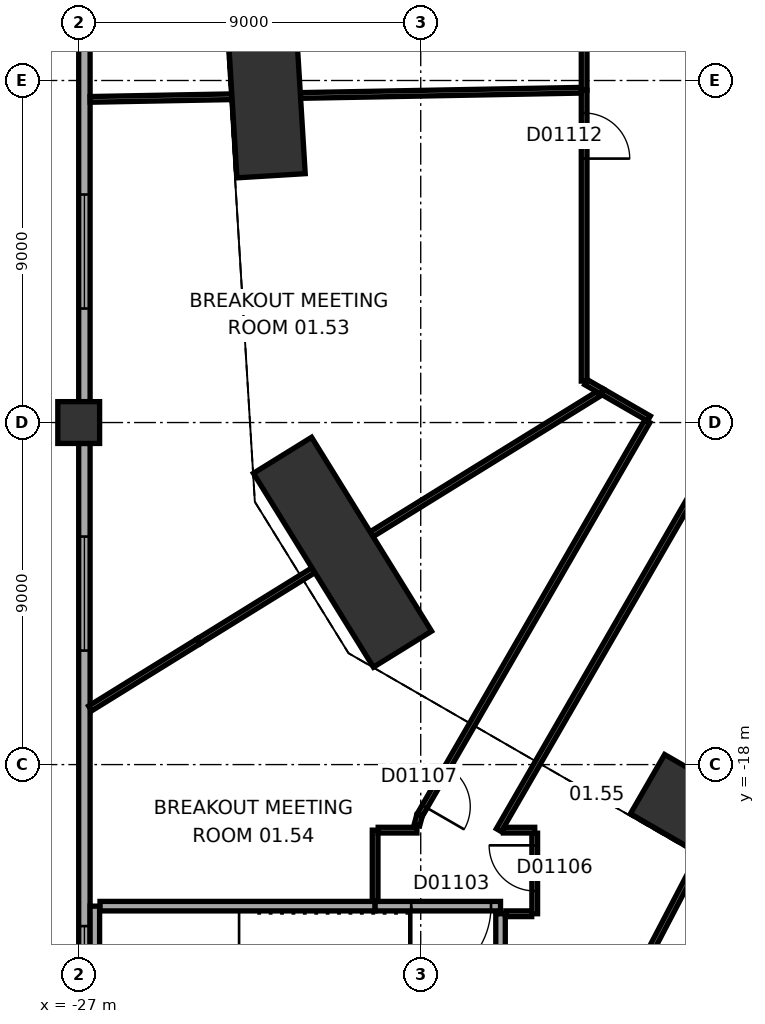
"""IFC4 building model, lengths in metres.
Left out: names, types, materials, properties, quantities, classifications, styles, units other than length and angle.
Written with IfcOpenShell. Run it as: python <this file> out.ifc"""

import sys

from ifc_helpers import new_model, si_unit, direction, frame, frame_2d, origin, origin_2d, place, context, subcontext, project, spatial, rectangle, extrude, element, fill, save


model = new_model("IFC4")
c1 = context("Model", 3, precision=1e-05, world=origin(), true_north=direction((0.0, 1.0)))
c2 = subcontext(c1, "Body", "Model", "MODEL_VIEW")
j1 = project(units=[si_unit("LENGTHUNIT", "METRE"), si_unit("PLANEANGLEUNIT", "RADIAN")], contexts=[c1])
p1 = place(None, origin())
s1 = spatial("IfcSite", under=j1, at=p1, CompositionType="ELEMENT")
p2 = place(p1, origin())
s2 = spatial("IfcBuilding", under=s1, at=p2, CompositionType="ELEMENT")
p3 = place(p2, frame((0.0, 0.0, 7.5)))
s3 = spatial("IfcBuildingStorey", under=s2, at=p3, CompositionType="ELEMENT", Elevation=7.5)
p4 = place(p3, frame((-22.066, -0.411, 0.0), z_axis=(0.0, 0.0, 1.0), x_axis=(0.061046797461, -0.99813490497, 0.0)))
e1 = element("IfcColumn", 1, at=p4, inside=s3, PredefinedType="COLUMN", context=c2, shape_type="SweptSolid", body=[
    extrude(rectangle(XDim=4.2, YDim=1.8, at=origin_2d()), origin(), (0.0, 0.0, 1.0), 5.5),
])
p5 = place(p3, frame((-20.058, -12.413, 0.0), z_axis=(0.0, 0.0, 1.0), x_axis=(0.526202050444, -0.850359572245, 0.0)))
e2 = element("IfcColumn", 2, at=p5, inside=s3, PredefinedType="COLUMN", context=c2, shape_type="SweptSolid", body=[
    extrude(rectangle(XDim=6.0, YDim=1.8, at=origin_2d()), origin(), (0.0, 0.0, 1.0), 5.5),
])
p6 = place(p3, frame((-10.213, -19.564, 0.0), z_axis=(0.0, 0.0, 1.0), x_axis=(0.866028021766, -0.499995465495, 0.0)))
e3 = element("IfcColumn", 3, at=p6, inside=s3, PredefinedType="COLUMN", context=c2, shape_type="SweptSolid", body=[
    extrude(rectangle(XDim=4.2, YDim=1.8, at=origin_2d()), origin(), (0.0, 0.0, 1.0), 5.5),
])
p7 = place(p3, frame((-27.0, -9.0, 0.0), z_axis=(0.0, 0.0, 1.0), x_axis=(1.0, 0.0, 0.0)))
e4 = element("IfcColumn", 4, at=p7, inside=s3, PredefinedType="COLUMN", context=c2, shape_type="SweptSolid", body=[
    extrude(rectangle(XDim=1.1, YDim=1.1, at=origin_2d()), origin(), (0.0, 0.0, 1.0), 5.5),
])
p8 = place(p3, frame((-26.85, 8.45, 0.0), z_axis=(0.0, 0.0, 1.0), x_axis=(0.0, -1.0, 0.0)))
e5 = element("IfcWall", 5, at=p8, inside=s3, PredefinedType="STANDARD", context=c2, shape_type="SweptSolid", body=[
    extrude(rectangle(XDim=16.9, YDim=0.3, at=frame_2d((8.45, 0.0))), origin(), (0.0, 0.0, 1.0), 4.0),
])
p9 = place(p8, frame((2.45, 0.0, 1.0)))
e6 = element("IfcOpeningElement", 6, at=p9, cuts=e5, PredefinedType="OPENING", context=c2, shape_type="SweptSolid", body=[
    extrude(rectangle(XDim=3.0, YDim=2.6, at=frame_2d((1.5, 1.3))), frame((0.0, 0.16, 0.0), z_axis=(0.0, -1.0, 0.0), x_axis=(1.0, 0.0, 0.0)), (0.0, 0.0, 1.0), 0.32),
])
p10 = place(p8, frame((11.45, 0.0, 1.0)))
e7 = element("IfcOpeningElement", 7, at=p10, cuts=e5, PredefinedType="OPENING", context=c2, shape_type="SweptSolid", body=[
    extrude(rectangle(XDim=3.0, YDim=2.6, at=frame_2d((1.5, 1.3))), frame((0.0, 0.16, 0.0), z_axis=(0.0, -1.0, 0.0), x_axis=(1.0, 0.0, 0.0)), (0.0, 0.0, 1.0), 0.32),
])
p11 = place(p3, frame((-26.85, -9.55, 0.0), z_axis=(0.0, 0.0, 1.0), x_axis=(0.0, -1.0, 0.0)))
e8 = element("IfcWall", 8, at=p11, inside=s3, PredefinedType="STANDARD", context=c2, shape_type="SweptSolid", body=[
    extrude(rectangle(XDim=16.9, YDim=0.3, at=frame_2d((8.45, 0.0))), origin(), (0.0, 0.0, 1.0), 4.0),
])
p12 = place(p11, frame((2.45, 0.0, 1.0)))
e9 = element("IfcOpeningElement", 9, at=p12, cuts=e8, PredefinedType="OPENING", context=c2, shape_type="SweptSolid", body=[
    extrude(rectangle(XDim=3.0, YDim=2.6, at=frame_2d((1.5, 1.3))), frame((0.0, 0.16, 0.0), z_axis=(0.0, -1.0, 0.0), x_axis=(1.0, 0.0, 0.0)), (0.0, 0.0, 1.0), 0.32),
])
p13 = place(p11, frame((12.7, 0.0, 1.0)))
e10 = element("IfcOpeningElement", 10, at=p13, cuts=e8, PredefinedType="OPENING", context=c2, shape_type="SweptSolid", body=[
    extrude(rectangle(XDim=3.0, YDim=2.6, at=frame_2d((1.5, 1.3))), frame((0.0, 0.16, 0.0), z_axis=(0.0, -1.0, 0.0), x_axis=(1.0, 0.0, 0.0)), (0.0, 0.0, 1.0), 0.32),
])
p14 = place(p3, frame((-12.686, -24.3, 0.0), z_axis=(0.0, 0.0, 1.0), x_axis=(0.462800821993, 0.88646229427, 0.0)))
e11 = element("IfcWall", 11, at=p14, inside=s3, PredefinedType="PARTITIONING", context=c2, shape_type="SweptSolid", body=[
    extrude(rectangle(XDim=4.441, YDim=0.15, at=frame_2d((2.221, 0.0))), origin(), (0.0, 0.0, 1.0), 5.2),
])
p15 = place(p3, frame((-15.9, -21.925, 0.0), z_axis=(0.0, 0.0, 1.0), x_axis=(0.0, -1.0, 0.0)))
e12 = element("IfcWall", 12, at=p15, inside=s3, PredefinedType="SOLIDWALL", context=c2, shape_type="SweptSolid", body=[
    extrude(rectangle(XDim=4.515, YDim=0.25, at=frame_2d((2.257, 0.0))), origin(), (0.0, 0.0, 1.0), 5.2),
])
p16 = place(p3, frame((-15.08, -21.925, 0.0), z_axis=(0.0, 0.0, 1.0), x_axis=(-1.0, 0.0, 0.0)))
e13 = element("IfcWall", 13, at=p16, inside=s3, PredefinedType="PARTITIONING", context=c2, shape_type="SweptSolid", body=[
    extrude(rectangle(XDim=0.68, YDim=0.15, at=frame_2d((0.34, 0.0))), origin(), (0.0, 0.0, 1.0), 5.2),
])
p17 = place(p3, frame((-26.44, -21.725, 0.0), z_axis=(0.0, 0.0, 1.0), x_axis=(1.0, 0.0, 0.0)))
e14 = element("IfcWall", 14, at=p17, inside=s3, PredefinedType="SOLIDWALL", context=c2, shape_type="SweptSolid", body=[
    extrude(rectangle(XDim=7.24, YDim=0.25, at=frame_2d((3.62, 0.0))), origin(), (0.0, 0.0, 1.0), 5.2),
])
p18 = place(p3, frame((-19.2, -21.725, 0.0), z_axis=(0.0, 0.0, 1.0), x_axis=(1.0, 0.0, 0.0)))
e15 = element("IfcWall", 15, at=p18, inside=s3, PredefinedType="SOLIDWALL", context=c2, shape_type="SweptSolid", body=[
    extrude(rectangle(XDim=3.3, YDim=0.25, at=frame_2d((1.65, 0.0))), origin(), (0.0, 0.0, 1.0), 5.2),
])
p19 = place(p18, frame((0.95, 0.0, 0.0)))
e16 = element("IfcOpeningElement", 16, at=p19, cuts=e15, PredefinedType="OPENING", context=c2, shape_type="SweptSolid", body=[
    extrude(rectangle(XDim=2.1, YDim=2.4, at=frame_2d((1.05, 1.2))), frame((0.0, 0.135, 0.0), z_axis=(0.0, -1.0, 0.0), x_axis=(1.0, 0.0, 0.0)), (0.0, 0.0, 1.0), 0.27),
])
p20 = place(p3, frame((-19.2, -21.585, 0.0), z_axis=(0.0, 0.0, 1.0), x_axis=(0.0, 1.0, 0.0)))
e17 = element("IfcWall", 17, at=p20, inside=s3, PredefinedType="PARTITIONING", context=c2, shape_type="SweptSolid", body=[
    extrude(rectangle(XDim=1.86, YDim=0.15, at=frame_2d((0.93, 0.0))), origin(), (0.0, 0.0, 1.0), 5.2),
])
p21 = place(p3, frame((-15.0, -19.805, 0.0), z_axis=(0.0, 0.0, 1.0), x_axis=(0.0, -1.0, 0.0)))
e18 = element("IfcWall", 18, at=p21, inside=s3, PredefinedType="PARTITIONING", context=c2, shape_type="SweptSolid", body=[
    extrude(rectangle(XDim=2.12, YDim=0.15, at=frame_2d((1.06, 0.0))), origin(), (0.0, 0.0, 1.0), 5.2),
])
p22 = place(p21, frame((0.32, 0.0, 0.0)))
e19 = element("IfcOpeningElement", 19, at=p22, cuts=e18, PredefinedType="OPENING", context=c2, shape_type="SweptSolid", body=[
    extrude(rectangle(XDim=1.2, YDim=2.1, at=frame_2d((0.6, 1.05))), frame((0.0, 0.085, 0.0), z_axis=(0.0, -1.0, 0.0), x_axis=(1.0, 0.0, 0.0)), (0.0, 0.0, 1.0), 0.17),
])
p23 = place(p3, frame((-19.12, -19.725, 0.0), z_axis=(0.0, 0.0, 1.0), x_axis=(1.0, 0.0, 0.0)))
e20 = element("IfcWall", 20, at=p23, inside=s3, PredefinedType="PARTITIONING", context=c2, shape_type="SweptSolid", body=[
    extrude(rectangle(XDim=1.02, YDim=0.15, at=frame_2d((0.51, 0.0))), origin(), (0.0, 0.0, 1.0), 5.2),
])
p24 = place(p3, frame((-15.825, -19.725, 0.0), z_axis=(0.0, 0.0, 1.0), x_axis=(1.0, 0.0, 0.0)))
e21 = element("IfcWall", 21, at=p24, inside=s3, PredefinedType="PARTITIONING", context=c2, shape_type="SweptSolid", body=[
    extrude(rectangle(XDim=0.825, YDim=0.15, at=frame_2d((0.413, 0.0))), origin(), (0.0, 0.0, 1.0), 5.2),
])
p25 = place(p3, frame((-18.1, -19.593, 0.0), z_axis=(0.0, 0.0, 1.0), x_axis=(0.260139468531, 0.965571052234, 0.0)))
e22 = element("IfcWall", 22, at=p25, inside=s3, PredefinedType="PARTITIONING", context=c2, shape_type="SweptSolid", body=[
    extrude(rectangle(XDim=0.264, YDim=0.15, at=frame_2d((0.132, 0.0))), origin(), (0.0, 0.0, 1.0), 5.2),
])
p26 = place(p3, frame((-18.021, -19.321, 0.0), z_axis=(0.0, 0.0, 1.0), x_axis=(0.500403049961, 0.865792577694, 0.0)))
e23 = element("IfcWall", 23, at=p26, inside=s3, PredefinedType="PARTITIONING", context=c2, shape_type="SweptSolid", body=[
    extrude(rectangle(XDim=11.963, YDim=0.15, at=frame_2d((5.982, 0.0))), origin(), (0.0, 0.0, 1.0), 5.2),
])
p27 = place(p26, frame((0.25, 0.0, 0.0)))
e24 = element("IfcOpeningElement", 24, at=p27, cuts=e23, PredefinedType="OPENING", context=c2, shape_type="SweptSolid", body=[
    extrude(rectangle(XDim=1.2, YDim=2.1, at=frame_2d((0.6, 1.05))), frame((0.0, 0.085, 0.0), z_axis=(0.0, -1.0, 0.0), x_axis=(1.0, 0.0, 0.0)), (0.0, 0.0, 1.0), 0.17),
])
p28 = place(p3, frame((-23.843, -14.754, 0.0), z_axis=(0.0, 0.0, 1.0), x_axis=(-0.850333278488, -0.526244539635, 0.0)))
e25 = element("IfcWall", 25, at=p28, inside=s3, PredefinedType="PARTITIONING", context=c2, shape_type="SweptSolid", body=[
    extrude(rectangle(XDim=3.36, YDim=0.15, at=frame_2d((1.68, 0.0))), origin(), (0.0, 0.0, 1.0), 5.2),
])
p29 = place(p3, frame((-23.843, -14.754, 0.0), z_axis=(0.0, 0.0, 1.0), x_axis=(0.850369165181, 0.526186547633, 0.0)))
e26 = element("IfcWall", 26, at=p29, inside=s3, PredefinedType="PARTITIONING", context=c2, shape_type="SweptSolid", body=[
    extrude(rectangle(XDim=3.551, YDim=0.15, at=frame_2d((1.775, 0.0))), origin(), (0.0, 0.0, 1.0), 5.2),
])
p30 = place(p3, frame((-19.293, -11.939, 0.0), z_axis=(0.0, 0.0, 1.0), x_axis=(0.85034374829, 0.526227621609, 0.0)))
e27 = element("IfcWall", 27, at=p30, inside=s3, PredefinedType="PARTITIONING", context=c2, shape_type="SweptSolid", body=[
    extrude(rectangle(XDim=7.016, YDim=0.15, at=frame_2d((3.508, 0.0))), origin(), (0.0, 0.0, 1.0), 5.2),
])
p31 = place(p3, frame((-10.303, -9.963, 0.0), z_axis=(0.0, 0.0, 1.0), x_axis=(-0.500409628778, -0.865788775295, 0.0)))
e28 = element("IfcWall", 28, at=p31, inside=s3, PredefinedType="PARTITIONING", context=c2, shape_type="SweptSolid", body=[
    extrude(rectangle(XDim=11.275, YDim=0.15, at=frame_2d((5.637, 0.0))), origin(), (0.0, 0.0, 1.0), 5.2),
])
p32 = place(p3, frame((-11.995, -8.894, 0.0), z_axis=(0.0, 0.0, 1.0), x_axis=(-0.866076810767, 0.499910949922, 0.0)))
e29 = element("IfcWall", 29, at=p32, inside=s3, PredefinedType="PARTITIONING", context=c2, shape_type="SweptSolid", body=[
    extrude(rectangle(XDim=1.42, YDim=0.15, at=frame_2d((0.71, 0.0))), origin(), (0.0, 0.0, 1.0), 5.2),
])
p33 = place(p3, frame((-13.648, -7.939, 0.0), z_axis=(0.0, 0.0, 1.0), x_axis=(0.865585916185, -0.500760443428, 0.0)))
e30 = element("IfcWall", 30, at=p33, inside=s3, PredefinedType="PARTITIONING", context=c2, shape_type="SweptSolid", body=[
    extrude(rectangle(XDim=0.489, YDim=0.15, at=frame_2d((0.244, 0.0))), origin(), (0.0, 0.0, 1.0), 5.2),
])
p34 = place(p3, frame((-13.7, -7.909, 0.0), z_axis=(0.0, 0.0, 1.0), x_axis=(0.0, 1.0, 0.0)))
e31 = element("IfcWall", 31, at=p34, inside=s3, PredefinedType="PARTITIONING", context=c2, shape_type="SweptSolid", body=[
    extrude(rectangle(XDim=7.655, YDim=0.15, at=frame_2d((3.827, 0.0))), origin(), (0.0, 0.0, 1.0), 5.2),
])
p35 = place(p34, frame((5.854, 0.0, 0.0)))
e32 = element("IfcOpeningElement", 32, at=p35, cuts=e31, PredefinedType="OPENING", context=c2, shape_type="SweptSolid", body=[
    extrude(rectangle(XDim=1.2, YDim=2.1, at=frame_2d((0.6, 1.05))), frame((0.0, 0.085, 0.0), z_axis=(0.0, -1.0, 0.0), x_axis=(1.0, 0.0, 0.0)), (0.0, 0.0, 1.0), 0.17),
])
p36 = place(p3, frame((-22.967, -0.427, 0.0), z_axis=(0.0, 0.0, 1.0), x_axis=(-0.999826372694, -0.018633959993, 0.0)))
e33 = element("IfcWall", 33, at=p36, inside=s3, PredefinedType="PARTITIONING", context=c2, shape_type="SweptSolid", body=[
    extrude(rectangle(XDim=3.734, YDim=0.15, at=frame_2d((1.867, 0.0))), origin(), (0.0, 0.0, 1.0), 5.2),
])
p37 = place(p3, frame((-13.78, -0.257, 0.0), z_axis=(0.0, 0.0, 1.0), x_axis=(-0.999826849708, -0.018608347649, 0.0)))
e34 = element("IfcWall", 34, at=p37, inside=s3, PredefinedType="MOVABLE", context=c2, shape_type="SweptSolid", body=[
    extrude(rectangle(XDim=7.386, YDim=0.15, at=frame_2d((3.693, 0.0))), origin(), (0.0, 0.0, 1.0), 5.2),
])
p38 = place(p3, frame((-13.7, -0.255, 0.0), z_axis=(0.0, 0.0, 1.0), x_axis=(0.0, 1.0, 0.0)))
e35 = element("IfcWall", 35, at=p38, inside=s3, PredefinedType="PARTITIONING", context=c2, shape_type="SweptSolid", body=[
    extrude(rectangle(XDim=7.616, YDim=0.15, at=frame_2d((3.808, 0.0))), origin(), (0.0, 0.0, 1.0), 5.2),
])
p39 = place(p38, frame((5.667, 0.0, 0.0)))
e36 = element("IfcOpeningElement", 36, at=p39, cuts=e35, PredefinedType="OPENING", context=c2, shape_type="SweptSolid", body=[
    extrude(rectangle(XDim=1.4, YDim=2.4, at=frame_2d((0.7, 1.2))), frame((0.0, 0.085, 0.0), z_axis=(0.0, -1.0, 0.0), x_axis=(1.0, 0.0, 0.0)), (0.0, 0.0, 1.0), 0.17),
])
p40 = place(p3, frame((-26.575, -21.725, 0.0), z_axis=(0.0, 0.0, 1.0), x_axis=(0.0, -1.0, 0.0)))
e37 = element("IfcWall", 37, at=p40, inside=s3, PredefinedType="SOLIDWALL", context=c2, shape_type="SweptSolid", body=[
    extrude(rectangle(XDim=4.975, YDim=0.25, at=frame_2d((2.487, 0.0))), origin(), (0.0, 0.0, 1.0), 5.2),
])
p41 = place(p10, origin())
e38 = element("IfcWindow", 38, at=p41, inside=s3, PartitioningType="SINGLE_PANEL", PredefinedType="WINDOW", context=c2, shape_type="SweptSolid", body=[
    extrude(rectangle(XDim=3.0, YDim=2.6, at=frame_2d((1.5, 1.3))), frame((0.0, 0.03, 0.0), z_axis=(0.0, -1.0, 0.0), x_axis=(1.0, 0.0, 0.0)), (0.0, 0.0, 1.0), 0.06),
])
fill(e7, e38)
p42 = place(p12, origin())
e39 = element("IfcWindow", 39, at=p42, inside=s3, PartitioningType="SINGLE_PANEL", PredefinedType="WINDOW", context=c2, shape_type="SweptSolid", body=[
    extrude(rectangle(XDim=3.0, YDim=2.6, at=frame_2d((1.5, 1.3))), frame((0.0, 0.03, 0.0), z_axis=(0.0, -1.0, 0.0), x_axis=(1.0, 0.0, 0.0)), (0.0, 0.0, 1.0), 0.06),
])
fill(e9, e39)
p43 = place(p13, origin())
e40 = element("IfcWindow", 40, at=p43, inside=s3, PartitioningType="SINGLE_PANEL", PredefinedType="WINDOW", context=c2, shape_type="SweptSolid", body=[
    extrude(rectangle(XDim=3.0, YDim=2.6, at=frame_2d((1.5, 1.3))), frame((0.0, 0.03, 0.0), z_axis=(0.0, -1.0, 0.0), x_axis=(1.0, 0.0, 0.0)), (0.0, 0.0, 1.0), 0.06),
])
fill(e10, e40)
p44 = place(p19, frame((2.1, 0.0, 0.0), z_axis=(0.0, 0.0, 1.0), x_axis=(-1.0, 0.0, 0.0)))
e41 = element("IfcDoor", 41, at=p44, inside=s3, OperationType="DOUBLE_DOOR_SINGLE_SWING", PredefinedType="DOOR", context=c2, shape_type="SweptSolid", body=[
    extrude(rectangle(XDim=2.1, YDim=2.4, at=frame_2d((1.05, 1.2))), frame((0.0, 0.025, 0.0), z_axis=(0.0, -1.0, 0.0), x_axis=(1.0, 0.0, 0.0)), (0.0, 0.0, 1.0), 0.05),
])
fill(e16, e41)
p45 = place(p22, origin())
e42 = element("IfcDoor", 42, at=p45, inside=s3, OperationType="SINGLE_SWING_LEFT", PredefinedType="DOOR", context=c2, shape_type="SweptSolid", body=[
    extrude(rectangle(XDim=1.2, YDim=2.1, at=frame_2d((0.6, 1.05))), frame((0.0, 0.025, 0.0), z_axis=(0.0, -1.0, 0.0), x_axis=(1.0, 0.0, 0.0)), (0.0, 0.0, 1.0), 0.05),
])
fill(e19, e42)
p46 = place(p27, origin())
e43 = element("IfcDoor", 43, at=p46, inside=s3, OperationType="SINGLE_SWING_LEFT", PredefinedType="DOOR", context=c2, shape_type="SweptSolid", body=[
    extrude(rectangle(XDim=1.2, YDim=2.1, at=frame_2d((0.6, 1.05))), frame((0.0, 0.025, 0.0), z_axis=(0.0, -1.0, 0.0), x_axis=(1.0, 0.0, 0.0)), (0.0, 0.0, 1.0), 0.05),
])
fill(e24, e43)
p47 = place(p35, origin())
e44 = element("IfcDoor", 44, at=p47, inside=s3, OperationType="SINGLE_SWING_LEFT", PredefinedType="DOOR", context=c2, shape_type="SweptSolid", body=[
    extrude(rectangle(XDim=1.2, YDim=2.1, at=frame_2d((0.6, 1.05))), frame((0.0, 0.025, 0.0), z_axis=(0.0, -1.0, 0.0), x_axis=(1.0, 0.0, 0.0)), (0.0, 0.0, 1.0), 0.05),
])
fill(e32, e44)
save(model, sys.argv[1])
